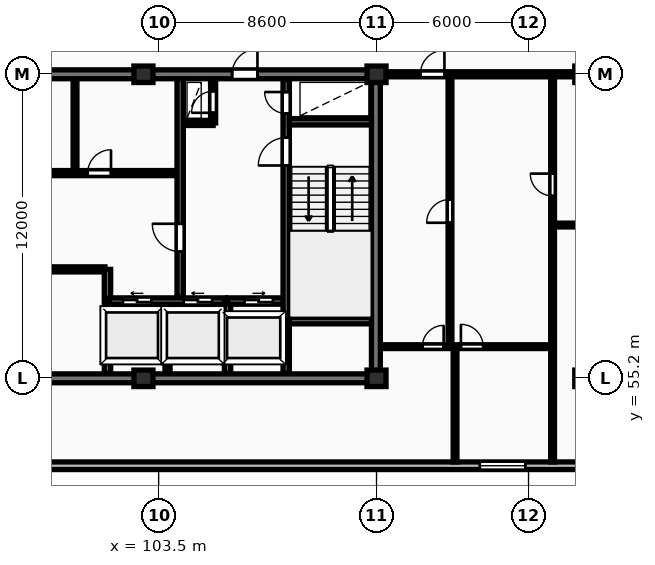
"""IFC4 building model, lengths in metres.
Left out: names, types, materials, properties, quantities, classifications, styles, units other than length and angle.
Written with IfcOpenShell. Run it as: python <this file> out.ifc"""

import sys

from ifc_helpers import new_model, si_unit, direction, frame, frame_2d, origin, origin_2d, place, context, subcontext, project, spatial, rectangle, extrude, element, fill, save


model = new_model("IFC4")
c1 = context("Model", 3, precision=1e-05, world=origin(), true_north=direction((0.0, 1.0)))
c2 = subcontext(c1, "Body", "Model", "MODEL_VIEW")
j1 = project(units=[si_unit("LENGTHUNIT", "METRE"), si_unit("PLANEANGLEUNIT", "RADIAN")], contexts=[c1])
p1 = place(None, origin())
s1 = spatial("IfcSite", under=j1, at=p1, CompositionType="ELEMENT")
p2 = place(p1, origin())
s2 = spatial("IfcBuilding", under=s1, at=p2, CompositionType="ELEMENT")
p3 = place(p2, frame((0.0, 0.0, 249.35)))
s3 = spatial("IfcBuildingStorey", under=s2, at=p3, CompositionType="ELEMENT", Elevation=249.35)
for number, where, z_axis, x_axis in (
    (1, (102.9, 55.2, 0.0), (0.0, 0.0, 1.0), (1.0, 0.0, 0.0)),
    (2, (102.9, 67.2, 0.0), (0.0, 0.0, 1.0), (1.0, 0.0, 0.0)),
    (3, (112.1, 55.2, 0.0), (0.0, 0.0, 1.0), (1.0, 0.0, 0.0)),
    (4, (112.1, 67.2, 0.0), (0.0, 0.0, 1.0), (1.0, 0.0, 0.0)),
    (5, (120.3, 55.2, 0.0), (0.0, 0.0, 1.0), (1.0, 0.0, 0.0)),
    (6, (120.3, 67.2, 0.0), (0.0, 0.0, 1.0), (1.0, 0.0, 0.0)),
):
    element("IfcColumn", number, at=place(p3, frame(where, z_axis=z_axis, x_axis=x_axis)), inside=s3, PredefinedType="COLUMN", context=c2, shape_type="SweptSolid", body=[
        extrude(rectangle(XDim=0.75, YDim=0.65, at=origin_2d()), origin(), (0.0, 0.0, 1.0), 3.45),
    ])
p4 = place(p3, frame((59.8, 51.75, 0.0), z_axis=(0.0, 0.0, 1.0), x_axis=(1.0, 0.0, 0.0)))
e7 = element("IfcWall", 7, at=p4, inside=s3, PredefinedType="STANDARD", context=c2, shape_type="SweptSolid", body=[
    extrude(rectangle(XDim=68.6, YDim=0.3, at=frame_2d((34.3, 0.0))), origin(), (0.0, 0.0, 1.0), 3.17),
])
p5 = place(p4, frame((13.025, 0.0, 0.85)))
e8 = element("IfcOpeningElement", 8, at=p5, cuts=e7, PredefinedType="OPENING", context=c2, shape_type="SweptSolid", body=[
    extrude(rectangle(XDim=1.8, YDim=1.8, at=frame_2d((0.9, 0.9))), frame((0.0, 0.16, 0.0), z_axis=(0.0, -1.0, 0.0), x_axis=(1.0, 0.0, 0.0)), (0.0, 0.0, 1.0), 0.32),
])
p6 = place(p4, frame((56.375, 0.0, 0.85)))
e9 = element("IfcOpeningElement", 9, at=p6, cuts=e7, PredefinedType="OPENING", context=c2, shape_type="SweptSolid", body=[
    extrude(rectangle(XDim=1.8, YDim=1.8, at=frame_2d((0.9, 0.9))), frame((0.0, 0.16, 0.0), z_axis=(0.0, -1.0, 0.0), x_axis=(1.0, 0.0, 0.0)), (0.0, 0.0, 1.0), 0.32),
])
p7 = place(p3, frame((75.95, 55.2, 0.0), z_axis=(0.0, 0.0, 1.0), x_axis=(1.0, 0.0, 0.0)))
e10 = element("IfcWall", 10, at=p7, inside=s3, PredefinedType="SHEAR", context=c2, shape_type="SweptSolid", body=[
    extrude(rectangle(XDim=36.3, YDim=0.35, at=frame_2d((18.15, 0.0))), origin(), (0.0, 0.0, 1.0), 3.45),
])
p8 = place(p3, frame((112.075, 55.375, 0.0), z_axis=(0.0, 0.0, 1.0), x_axis=(0.0, 1.0, 0.0)))
e11 = element("IfcWall", 11, at=p8, inside=s3, PredefinedType="SHEAR", context=c2, shape_type="SweptSolid", body=[
    extrude(rectangle(XDim=11.65, YDim=0.35, at=frame_2d((5.825, 0.0))), origin(), (0.0, 0.0, 1.0), 3.45),
])
p9 = place(p3, frame((75.95, 67.2, 0.0), z_axis=(0.0, 0.0, 1.0), x_axis=(1.0, 0.0, 0.0)))
e12 = element("IfcWall", 12, at=p9, inside=s3, PredefinedType="SHEAR", context=c2, shape_type="SweptSolid", body=[
    extrude(rectangle(XDim=36.3, YDim=0.35, at=frame_2d((18.15, 0.0))), origin(), (0.0, 0.0, 1.0), 3.45),
])
p10 = place(p9, frame((5.25, 0.0, 0.0)))
e13 = element("IfcOpeningElement", 13, at=p10, cuts=e12, PredefinedType="OPENING", context=c2, shape_type="SweptSolid", body=[
    extrude(rectangle(XDim=1.0, YDim=2.15, at=frame_2d((0.5, 1.075))), frame((0.0, 0.185, 0.0), z_axis=(0.0, -1.0, 0.0), x_axis=(1.0, 0.0, 0.0)), (0.0, 0.0, 1.0), 0.37),
])
p11 = place(p9, frame((21.6, 0.0, 0.0)))
e14 = element("IfcOpeningElement", 14, at=p11, cuts=e12, PredefinedType="OPENING", context=c2, shape_type="SweptSolid", body=[
    extrude(rectangle(XDim=1.5, YDim=2.2, at=frame_2d((0.75, 1.1))), frame((0.0, 0.185, 0.0), z_axis=(0.0, -1.0, 0.0), x_axis=(1.0, 0.0, 0.0)), (0.0, 0.0, 1.0), 0.37),
])
p12 = place(p9, frame((30.45, 0.0, 0.0)))
e15 = element("IfcOpeningElement", 15, at=p12, cuts=e12, PredefinedType="OPENING", context=c2, shape_type="SweptSolid", body=[
    extrude(rectangle(XDim=1.0, YDim=2.15, at=frame_2d((0.5, 1.075))), frame((0.0, 0.185, 0.0), z_axis=(0.0, -1.0, 0.0), x_axis=(1.0, 0.0, 0.0)), (0.0, 0.0, 1.0), 0.37),
])
p13 = place(p3, frame((93.02, 59.5, 0.0), z_axis=(0.0, 0.0, 1.0), x_axis=(1.0, 0.0, 0.0)))
e16 = element("IfcWall", 16, at=p13, inside=s3, PredefinedType="PARTITIONING", context=c2, shape_type="SweptSolid", body=[
    extrude(rectangle(XDim=8.36, YDim=0.2, at=frame_2d((4.18, 0.0))), origin(), (0.0, 0.0, 1.0), 3.17),
])
p14 = place(p13, frame((3.4, 0.0, 0.0)))
e17 = element("IfcOpeningElement", 17, at=p14, cuts=e16, PredefinedType="OPENING", context=c2, shape_type="SweptSolid", body=[
    extrude(rectangle(XDim=0.92, YDim=2.08, at=frame_2d((0.46, 1.04))), frame((0.0, 0.11, 0.0), z_axis=(0.0, -1.0, 0.0), x_axis=(1.0, 0.0, 0.0)), (0.0, 0.0, 1.0), 0.22),
])
p15 = place(p3, frame((101.48, 55.4, 0.0), z_axis=(0.0, 0.0, 1.0), x_axis=(0.0, 1.0, 0.0)))
e18 = element("IfcWall", 18, at=p15, inside=s3, PredefinedType="SHEAR", context=c2, shape_type="SweptSolid", body=[
    extrude(rectangle(XDim=4.1, YDim=0.25, at=frame_2d((2.05, 0.0))), origin(), (0.0, 0.0, 1.0), 3.45),
])
p16 = place(p3, frame((103.85, 55.4, 0.0), z_axis=(0.0, 0.0, 1.0), x_axis=(0.0, 1.0, 0.0)))
e19 = element("IfcWall", 19, at=p16, inside=s3, PredefinedType="PARTITIONING", context=c2, shape_type="SweptSolid", body=[
    extrude(rectangle(XDim=2.72, YDim=0.2, at=frame_2d((1.36, 0.0))), origin(), (0.0, 0.0, 1.0), 3.17),
])
p17 = place(p3, frame((101.55, 58.25, 0.0), z_axis=(0.0, 0.0, 1.0), x_axis=(1.0, 0.0, 0.0)))
e20 = element("IfcWall", 20, at=p17, inside=s3, PredefinedType="SHEAR", context=c2, shape_type="SweptSolid", body=[
    extrude(rectangle(XDim=4.6, YDim=0.25, at=frame_2d((2.3, 0.0))), origin(), (0.0, 0.0, 1.0), 3.45),
])
p18 = place(p17, frame((0.54, 0.0, 0.0)))
e21 = element("IfcOpeningElement", 21, at=p18, cuts=e20, PredefinedType="OPENING", context=c2, shape_type="SweptSolid", body=[
    extrude(rectangle(XDim=1.12, YDim=2.12, at=frame_2d((0.56, 1.06))), frame((0.0, 0.135, 0.0), z_axis=(0.0, -1.0, 0.0), x_axis=(1.0, 0.0, 0.0)), (0.0, 0.0, 1.0), 0.27),
])
p19 = place(p17, frame((2.94, 0.0, 0.0)))
e22 = element("IfcOpeningElement", 22, at=p19, cuts=e20, PredefinedType="OPENING", context=c2, shape_type="SweptSolid", body=[
    extrude(rectangle(XDim=1.12, YDim=2.12, at=frame_2d((0.56, 1.06))), frame((0.0, 0.135, 0.0), z_axis=(0.0, -1.0, 0.0), x_axis=(1.0, 0.0, 0.0)), (0.0, 0.0, 1.0), 0.27),
])
p20 = place(p3, frame((106.22, 55.4, 0.0), z_axis=(0.0, 0.0, 1.0), x_axis=(0.0, 1.0, 0.0)))
e23 = element("IfcWall", 23, at=p20, inside=s3, PredefinedType="SHEAR", context=c2, shape_type="SweptSolid", body=[
    extrude(rectangle(XDim=2.85, YDim=0.25, at=frame_2d((1.425, 0.0))), origin(), (0.0, 0.0, 1.0), 3.45),
])
p21 = place(p3, frame((106.22, 58.25, 0.0), z_axis=(0.0, 0.0, 1.0), x_axis=(1.0, 0.0, 0.0)))
e24 = element("IfcWall", 24, at=p21, inside=s3, PredefinedType="SHEAR", context=c2, shape_type="SweptSolid", body=[
    extrude(rectangle(XDim=2.46, YDim=0.25, at=frame_2d((1.23, 0.0))), origin(), (0.0, 0.0, 1.0), 3.45),
])
p22 = place(p21, frame((0.67, 0.0, 0.0)))
e25 = element("IfcOpeningElement", 25, at=p22, cuts=e24, PredefinedType="OPENING", context=c2, shape_type="SweptSolid", body=[
    extrude(rectangle(XDim=1.12, YDim=2.12, at=frame_2d((0.56, 1.06))), frame((0.0, 0.135, 0.0), z_axis=(0.0, -1.0, 0.0), x_axis=(1.0, 0.0, 0.0)), (0.0, 0.0, 1.0), 0.27),
])
p23 = place(p3, frame((100.2, 63.4, 0.0), z_axis=(0.0, 0.0, 1.0), x_axis=(0.0, 1.0, 0.0)))
e26 = element("IfcWall", 26, at=p23, inside=s3, PredefinedType="PARTITIONING", context=c2, shape_type="SweptSolid", body=[
    extrude(rectangle(XDim=3.6, YDim=0.15, at=frame_2d((1.8, 0.0))), origin(), (0.0, 0.0, 1.0), 3.17),
])
p24 = place(p3, frame((84.42, 63.3, 0.0), z_axis=(0.0, 0.0, 1.0), x_axis=(1.0, 0.0, 0.0)))
e27 = element("IfcWall", 27, at=p24, inside=s3, PredefinedType="PARTITIONING", context=c2, shape_type="SweptSolid", body=[
    extrude(rectangle(XDim=19.83, YDim=0.2, at=frame_2d((9.915, 0.0))), origin(), (0.0, 0.0, 1.0), 3.17),
])
p25 = place(p24, frame((1.15, 0.0, 0.0)))
e28 = element("IfcOpeningElement", 28, at=p25, cuts=e27, PredefinedType="OPENING", context=c2, shape_type="SweptSolid", body=[
    extrude(rectangle(XDim=0.85, YDim=2.05, at=frame_2d((0.425, 1.025))), frame((0.0, 0.11, 0.0), z_axis=(0.0, -1.0, 0.0), x_axis=(1.0, 0.0, 0.0)), (0.0, 0.0, 1.0), 0.22),
])
p26 = place(p24, frame((3.25, 0.0, 0.0)))
e29 = element("IfcOpeningElement", 29, at=p26, cuts=e27, PredefinedType="OPENING", context=c2, shape_type="SweptSolid", body=[
    extrude(rectangle(XDim=0.85, YDim=2.05, at=frame_2d((0.425, 1.025))), frame((0.0, 0.11, 0.0), z_axis=(0.0, -1.0, 0.0), x_axis=(1.0, 0.0, 0.0)), (0.0, 0.0, 1.0), 0.22),
])
p27 = place(p24, frame((13.08, 0.0, 0.0)))
e30 = element("IfcOpeningElement", 30, at=p27, cuts=e27, PredefinedType="OPENING", context=c2, shape_type="SweptSolid", body=[
    extrude(rectangle(XDim=1.5, YDim=2.2, at=frame_2d((0.75, 1.1))), frame((0.0, 0.11, 0.0), z_axis=(0.0, -1.0, 0.0), x_axis=(1.0, 0.0, 0.0)), (0.0, 0.0, 1.0), 0.22),
])
p28 = place(p24, frame((6.78, 0.0, 0.0)))
e31 = element("IfcOpeningElement", 31, at=p28, cuts=e27, PredefinedType="OPENING", context=c2, shape_type="SweptSolid", body=[
    extrude(rectangle(XDim=0.92, YDim=2.08, at=frame_2d((0.46, 1.04))), frame((0.0, 0.11, 0.0), z_axis=(0.0, -1.0, 0.0), x_axis=(1.0, 0.0, 0.0)), (0.0, 0.0, 1.0), 0.22),
])
p29 = place(p24, frame((16.28, 0.0, 0.0)))
e32 = element("IfcOpeningElement", 32, at=p29, cuts=e27, PredefinedType="OPENING", context=c2, shape_type="SweptSolid", body=[
    extrude(rectangle(XDim=0.92, YDim=2.08, at=frame_2d((0.46, 1.04))), frame((0.0, 0.11, 0.0), z_axis=(0.0, -1.0, 0.0), x_axis=(1.0, 0.0, 0.0)), (0.0, 0.0, 1.0), 0.22),
])
p30 = place(p3, frame((104.45, 65.28, 0.0), z_axis=(0.0, 0.0, 1.0), x_axis=(1.0, 0.0, 0.0)))
e33 = element("IfcWall", 33, at=p30, inside=s3, PredefinedType="PARTITIONING", context=c2, shape_type="SweptSolid", body=[
    extrude(rectangle(XDim=1.2, YDim=0.2, at=frame_2d((0.6, 0.0))), origin(), (0.0, 0.0, 1.0), 3.17),
])
p31 = place(p3, frame((105.65, 65.28, 0.0), z_axis=(0.0, 0.0, 1.0), x_axis=(0.0, 1.0, 0.0)))
e34 = element("IfcWall", 34, at=p31, inside=s3, PredefinedType="PARTITIONING", context=c2, shape_type="SweptSolid", body=[
    extrude(rectangle(XDim=1.72, YDim=0.2, at=frame_2d((0.86, 0.0))), origin(), (0.0, 0.0, 1.0), 3.17),
])
p32 = place(p31, frame((0.4, 0.0, 0.0)))
e35 = element("IfcOpeningElement", 35, at=p32, cuts=e34, PredefinedType="OPENING", context=c2, shape_type="SweptSolid", body=[
    extrude(rectangle(XDim=0.85, YDim=2.05, at=frame_2d((0.425, 1.025))), frame((0.0, 0.11, 0.0), z_axis=(0.0, -1.0, 0.0), x_axis=(1.0, 0.0, 0.0)), (0.0, 0.0, 1.0), 0.22),
])
p33 = place(p3, frame((104.35, 58.4, 0.0), z_axis=(0.0, 0.0, 1.0), x_axis=(0.0, 1.0, 0.0)))
e36 = element("IfcWall", 36, at=p33, inside=s3, PredefinedType="SHEAR", context=c2, shape_type="SweptSolid", body=[
    extrude(rectangle(XDim=8.6, YDim=0.25, at=frame_2d((4.3, 0.0))), origin(), (0.0, 0.0, 1.0), 3.45),
])
p34 = place(p33, frame((1.8, 0.0, 0.0)))
e37 = element("IfcOpeningElement", 37, at=p34, cuts=e36, PredefinedType="OPENING", context=c2, shape_type="SweptSolid", body=[
    extrude(rectangle(XDim=1.1, YDim=2.1, at=frame_2d((0.55, 1.05))), frame((0.0, 0.135, 0.0), z_axis=(0.0, -1.0, 0.0), x_axis=(1.0, 0.0, 0.0)), (0.0, 0.0, 1.0), 0.27),
])
p35 = place(p3, frame((108.535, 55.4, 0.0), z_axis=(0.0, 0.0, 1.0), x_axis=(0.0, 1.0, 0.0)))
e38 = element("IfcWall", 38, at=p35, inside=s3, PredefinedType="SHEAR", context=c2, shape_type="SweptSolid", body=[
    extrude(rectangle(XDim=11.6, YDim=0.25, at=frame_2d((5.8, 0.0))), origin(), (0.0, 0.0, 1.0), 3.45),
])
p36 = place(p35, frame((8.2, 0.0, 0.0)))
e39 = element("IfcOpeningElement", 39, at=p36, cuts=e38, PredefinedType="OPENING", context=c2, shape_type="SweptSolid", body=[
    extrude(rectangle(XDim=1.1, YDim=2.1, at=frame_2d((0.55, 1.05))), frame((0.0, 0.135, 0.0), z_axis=(0.0, -1.0, 0.0), x_axis=(1.0, 0.0, 0.0)), (0.0, 0.0, 1.0), 0.27),
])
p37 = place(p35, frame((10.25, 0.0, 0.0)))
e40 = element("IfcOpeningElement", 40, at=p37, cuts=e38, PredefinedType="OPENING", context=c2, shape_type="SweptSolid", body=[
    extrude(rectangle(XDim=0.85, YDim=2.05, at=frame_2d((0.425, 1.025))), frame((0.0, 0.135, 0.0), z_axis=(0.0, -1.0, 0.0), x_axis=(1.0, 0.0, 0.0)), (0.0, 0.0, 1.0), 0.27),
])
for number, where, z_axis, x_axis in (
    (41, (108.66, 57.475, 0.0), (0.0, 0.0, 1.0), (1.0, 0.0, 0.0)),
    (42, (108.66, 65.325, 0.0), (0.0, 0.0, 1.0), (1.0, 0.0, 0.0)),
):
    element("IfcWall", number, at=place(p3, frame(where, z_axis=z_axis, x_axis=x_axis)), inside=s3, PredefinedType="SHEAR", context=c2, shape_type="SweptSolid", body=[
        extrude(rectangle(XDim=3.24, YDim=0.25, at=frame_2d((1.62, 0.0))), origin(), (0.0, 0.0, 1.0), 3.45),
    ])
p38 = place(p3, frame((119.05, 61.25, 0.0), z_axis=(0.0, 0.0, 1.0), x_axis=(1.0, 0.0, 0.0)))
e43 = element("IfcWall", 43, at=p38, inside=s3, PredefinedType="PARTITIONING", context=c2, shape_type="SweptSolid", body=[
    extrude(rectangle(XDim=9.35, YDim=0.15, at=frame_2d((4.675, 0.0))), origin(), (0.0, 0.0, 1.0), 3.17),
])
p39 = place(p38, frame((4.255, 0.0, 0.0)))
e44 = element("IfcOpeningElement", 44, at=p39, cuts=e43, PredefinedType="OPENING", context=c2, shape_type="SweptSolid", body=[
    extrude(rectangle(XDim=0.84, YDim=2.04, at=frame_2d((0.42, 1.02))), frame((0.0, 0.085, 0.0), z_axis=(0.0, -1.0, 0.0), x_axis=(1.0, 0.0, 0.0)), (0.0, 0.0, 1.0), 0.17),
])
p40 = place(p3, frame((119.05, 51.9, 0.0), z_axis=(0.0, 0.0, 1.0), x_axis=(0.0, 1.0, 0.0)))
e45 = element("IfcWall", 45, at=p40, inside=s3, PredefinedType="PARTITIONING", context=c2, shape_type="SweptSolid", body=[
    extrude(rectangle(XDim=15.25, YDim=0.15, at=frame_2d((7.625, 0.0))), origin(), (0.0, 0.0, 1.0), 3.17),
])
p41 = place(p40, frame((10.5, 0.0, 0.0)))
e46 = element("IfcOpeningElement", 46, at=p41, cuts=e45, PredefinedType="OPENING", context=c2, shape_type="SweptSolid", body=[
    extrude(rectangle(XDim=0.88, YDim=2.06, at=frame_2d((0.44, 1.03))), frame((0.0, 0.085, 0.0), z_axis=(0.0, -1.0, 0.0), x_axis=(1.0, 0.0, 0.0)), (0.0, 0.0, 1.0), 0.17),
])
p42 = place(p3, frame((115.0, 56.45, 0.0), z_axis=(0.0, 0.0, 1.0), x_axis=(0.0, 1.0, 0.0)))
e47 = element("IfcWall", 47, at=p42, inside=s3, PredefinedType="PARTITIONING", context=c2, shape_type="SweptSolid", body=[
    extrude(rectangle(XDim=10.7, YDim=0.15, at=frame_2d((5.35, 0.0))), origin(), (0.0, 0.0, 1.0), 3.17),
])
p43 = place(p42, frame((4.89, 0.0, 0.0)))
e48 = element("IfcOpeningElement", 48, at=p43, cuts=e47, PredefinedType="OPENING", context=c2, shape_type="SweptSolid", body=[
    extrude(rectangle(XDim=0.92, YDim=2.08, at=frame_2d((0.46, 1.04))), frame((0.0, 0.085, 0.0), z_axis=(0.0, -1.0, 0.0), x_axis=(1.0, 0.0, 0.0)), (0.0, 0.0, 1.0), 0.17),
])
p44 = place(p3, frame((115.2, 51.9, 0.0), z_axis=(0.0, 0.0, 1.0), x_axis=(0.0, 1.0, 0.0)))
e49 = element("IfcWall", 49, at=p44, inside=s3, PredefinedType="PARTITIONING", context=c2, shape_type="SweptSolid", body=[
    extrude(rectangle(XDim=4.55, YDim=0.15, at=frame_2d((2.275, 0.0))), origin(), (0.0, 0.0, 1.0), 3.17),
])
p45 = place(p3, frame((112.27, 56.45, 0.0), z_axis=(0.0, 0.0, 1.0), x_axis=(1.0, 0.0, 0.0)))
e50 = element("IfcWall", 50, at=p45, inside=s3, PredefinedType="PARTITIONING", context=c2, shape_type="SweptSolid", body=[
    extrude(rectangle(XDim=6.76, YDim=0.15, at=frame_2d((3.38, 0.0))), origin(), (0.0, 0.0, 1.0), 3.17),
])
p46 = place(p45, frame((1.64, 0.0, 0.0)))
e51 = element("IfcOpeningElement", 51, at=p46, cuts=e50, PredefinedType="OPENING", context=c2, shape_type="SweptSolid", body=[
    extrude(rectangle(XDim=0.84, YDim=2.04, at=frame_2d((0.42, 1.02))), frame((0.0, 0.085, 0.0), z_axis=(0.0, -1.0, 0.0), x_axis=(1.0, 0.0, 0.0)), (0.0, 0.0, 1.0), 0.17),
])
p47 = place(p45, frame((3.16, 0.0, 0.0)))
e52 = element("IfcOpeningElement", 52, at=p47, cuts=e50, PredefinedType="OPENING", context=c2, shape_type="SweptSolid", body=[
    extrude(rectangle(XDim=0.88, YDim=2.06, at=frame_2d((0.44, 1.03))), frame((0.0, 0.085, 0.0), z_axis=(0.0, -1.0, 0.0), x_axis=(1.0, 0.0, 0.0)), (0.0, 0.0, 1.0), 0.17),
])
p48 = place(p3, frame((112.25, 67.2, 0.0), z_axis=(0.0, 0.0, 1.0), x_axis=(1.0, 0.0, 0.0)))
e53 = element("IfcWall", 53, at=p48, inside=s3, PredefinedType="PARTITIONING", context=c2, shape_type="SweptSolid", body=[
    extrude(rectangle(XDim=16.15, YDim=0.2, at=frame_2d((8.075, 0.0))), origin(), (0.0, 0.0, 1.0), 2.633),
])
p49 = place(p48, frame((1.58, 0.0, 0.0)))
e54 = element("IfcOpeningElement", 54, at=p49, cuts=e53, PredefinedType="OPENING", context=c2, shape_type="SweptSolid", body=[
    extrude(rectangle(XDim=0.95, YDim=2.15, at=frame_2d((0.475, 1.075))), frame((0.0, 0.11, 0.0), z_axis=(0.0, -1.0, 0.0), x_axis=(1.0, 0.0, 0.0)), (0.0, 0.0, 1.0), 0.22),
])
p50 = place(p6, origin())
e55 = element("IfcWindow", 55, at=p50, inside=s3, PartitioningType="SINGLE_PANEL", PredefinedType="WINDOW", context=c2, shape_type="SweptSolid", body=[
    extrude(rectangle(XDim=1.8, YDim=1.8, at=frame_2d((0.9, 0.9))), frame((0.0, 0.03, 0.0), z_axis=(0.0, -1.0, 0.0), x_axis=(1.0, 0.0, 0.0)), (0.0, 0.0, 1.0), 0.06),
])
fill(e9, e55)
p51 = place(p12, origin())
e56 = element("IfcDoor", 56, at=p51, inside=s3, OperationType="SINGLE_SWING_RIGHT", PredefinedType="DOOR", context=c2, shape_type="SweptSolid", body=[
    extrude(rectangle(XDim=1.0, YDim=2.15, at=frame_2d((0.5, 1.075))), frame((0.0, 0.025, 0.0), z_axis=(0.0, -1.0, 0.0), x_axis=(1.0, 0.0, 0.0)), (0.0, 0.0, 1.0), 0.05),
])
fill(e15, e56)
p52 = place(p18, origin())
e57 = element("IfcDoor", 57, at=p52, inside=s3, OperationType="SLIDING_TO_LEFT", PredefinedType="DOOR", context=c2, shape_type="SweptSolid", body=[
    extrude(rectangle(XDim=1.12, YDim=2.12, at=frame_2d((0.56, 1.06))), frame((0.0, 0.025, 0.0), z_axis=(0.0, -1.0, 0.0), x_axis=(1.0, 0.0, 0.0)), (0.0, 0.0, 1.0), 0.05),
])
fill(e21, e57)
p53 = place(p19, origin())
e58 = element("IfcDoor", 58, at=p53, inside=s3, OperationType="SLIDING_TO_LEFT", PredefinedType="DOOR", context=c2, shape_type="SweptSolid", body=[
    extrude(rectangle(XDim=1.12, YDim=2.12, at=frame_2d((0.56, 1.06))), frame((0.0, 0.025, 0.0), z_axis=(0.0, -1.0, 0.0), x_axis=(1.0, 0.0, 0.0)), (0.0, 0.0, 1.0), 0.05),
])
fill(e22, e58)
p54 = place(p22, origin())
e59 = element("IfcDoor", 59, at=p54, inside=s3, OperationType="SLIDING_TO_RIGHT", PredefinedType="DOOR", context=c2, shape_type="SweptSolid", body=[
    extrude(rectangle(XDim=1.12, YDim=2.12, at=frame_2d((0.56, 1.06))), frame((0.0, 0.025, 0.0), z_axis=(0.0, -1.0, 0.0), x_axis=(1.0, 0.0, 0.0)), (0.0, 0.0, 1.0), 0.05),
])
fill(e25, e59)
p55 = place(p29, origin())
e60 = element("IfcDoor", 60, at=p55, inside=s3, OperationType="SINGLE_SWING_RIGHT", PredefinedType="DOOR", context=c2, shape_type="SweptSolid", body=[
    extrude(rectangle(XDim=0.92, YDim=2.08, at=frame_2d((0.46, 1.04))), frame((0.0, 0.025, 0.0), z_axis=(0.0, -1.0, 0.0), x_axis=(1.0, 0.0, 0.0)), (0.0, 0.0, 1.0), 0.05),
])
fill(e32, e60)
p56 = place(p32, origin())
e61 = element("IfcDoor", 61, at=p56, inside=s3, OperationType="SINGLE_SWING_LEFT", PredefinedType="DOOR", context=c2, shape_type="SweptSolid", body=[
    extrude(rectangle(XDim=0.85, YDim=2.05, at=frame_2d((0.425, 1.025))), frame((0.0, 0.025, 0.0), z_axis=(0.0, -1.0, 0.0), x_axis=(1.0, 0.0, 0.0)), (0.0, 0.0, 1.0), 0.05),
])
fill(e35, e61)
p57 = place(p34, origin())
e62 = element("IfcDoor", 62, at=p57, inside=s3, OperationType="SINGLE_SWING_RIGHT", PredefinedType="DOOR", context=c2, shape_type="SweptSolid", body=[
    extrude(rectangle(XDim=1.1, YDim=2.1, at=frame_2d((0.55, 1.05))), frame((0.0, 0.025, 0.0), z_axis=(0.0, -1.0, 0.0), x_axis=(1.0, 0.0, 0.0)), (0.0, 0.0, 1.0), 0.05),
])
fill(e37, e62)
p58 = place(p36, origin())
e63 = element("IfcDoor", 63, at=p58, inside=s3, OperationType="SINGLE_SWING_LEFT", PredefinedType="DOOR", context=c2, shape_type="SweptSolid", body=[
    extrude(rectangle(XDim=1.1, YDim=2.1, at=frame_2d((0.55, 1.05))), frame((0.0, 0.025, 0.0), z_axis=(0.0, -1.0, 0.0), x_axis=(1.0, 0.0, 0.0)), (0.0, 0.0, 1.0), 0.05),
])
fill(e39, e63)
p59 = place(p37, origin())
e64 = element("IfcDoor", 64, at=p59, inside=s3, OperationType="SINGLE_SWING_RIGHT", PredefinedType="DOOR", context=c2, shape_type="SweptSolid", body=[
    extrude(rectangle(XDim=0.85, YDim=2.05, at=frame_2d((0.425, 1.025))), frame((0.0, 0.025, 0.0), z_axis=(0.0, -1.0, 0.0), x_axis=(1.0, 0.0, 0.0)), (0.0, 0.0, 1.0), 0.05),
])
fill(e40, e64)
p60 = place(p41, origin())
e65 = element("IfcDoor", 65, at=p60, inside=s3, OperationType="SINGLE_SWING_RIGHT", PredefinedType="DOOR", context=c2, shape_type="SweptSolid", body=[
    extrude(rectangle(XDim=0.88, YDim=2.06, at=frame_2d((0.44, 1.03))), frame((0.0, 0.025, 0.0), z_axis=(0.0, -1.0, 0.0), x_axis=(1.0, 0.0, 0.0)), (0.0, 0.0, 1.0), 0.05),
])
fill(e46, e65)
p61 = place(p43, origin())
e66 = element("IfcDoor", 66, at=p61, inside=s3, OperationType="SINGLE_SWING_LEFT", PredefinedType="DOOR", context=c2, shape_type="SweptSolid", body=[
    extrude(rectangle(XDim=0.92, YDim=2.08, at=frame_2d((0.46, 1.04))), frame((0.0, 0.025, 0.0), z_axis=(0.0, -1.0, 0.0), x_axis=(1.0, 0.0, 0.0)), (0.0, 0.0, 1.0), 0.05),
])
fill(e48, e66)
p62 = place(p46, origin())
e67 = element("IfcDoor", 67, at=p62, inside=s3, OperationType="SINGLE_SWING_RIGHT", PredefinedType="DOOR", context=c2, shape_type="SweptSolid", body=[
    extrude(rectangle(XDim=0.84, YDim=2.04, at=frame_2d((0.42, 1.02))), frame((0.0, 0.025, 0.0), z_axis=(0.0, -1.0, 0.0), x_axis=(1.0, 0.0, 0.0)), (0.0, 0.0, 1.0), 0.05),
])
fill(e51, e67)
p63 = place(p47, origin())
e68 = element("IfcDoor", 68, at=p63, inside=s3, OperationType="SINGLE_SWING_LEFT", PredefinedType="DOOR", context=c2, shape_type="SweptSolid", body=[
    extrude(rectangle(XDim=0.88, YDim=2.06, at=frame_2d((0.44, 1.03))), frame((0.0, 0.025, 0.0), z_axis=(0.0, -1.0, 0.0), x_axis=(1.0, 0.0, 0.0)), (0.0, 0.0, 1.0), 0.05),
])
fill(e52, e68)
p64 = place(p49, origin())
e69 = element("IfcDoor", 69, at=p64, inside=s3, OperationType="SINGLE_SWING_RIGHT", PredefinedType="DOOR", context=c2, shape_type="SweptSolid", body=[
    extrude(rectangle(XDim=0.95, YDim=2.15, at=frame_2d((0.475, 1.075))), frame((0.0, 0.025, 0.0), z_axis=(0.0, -1.0, 0.0), x_axis=(1.0, 0.0, 0.0)), (0.0, 0.0, 1.0), 0.05),
])
fill(e54, e69)
save(model, sys.argv[1])
